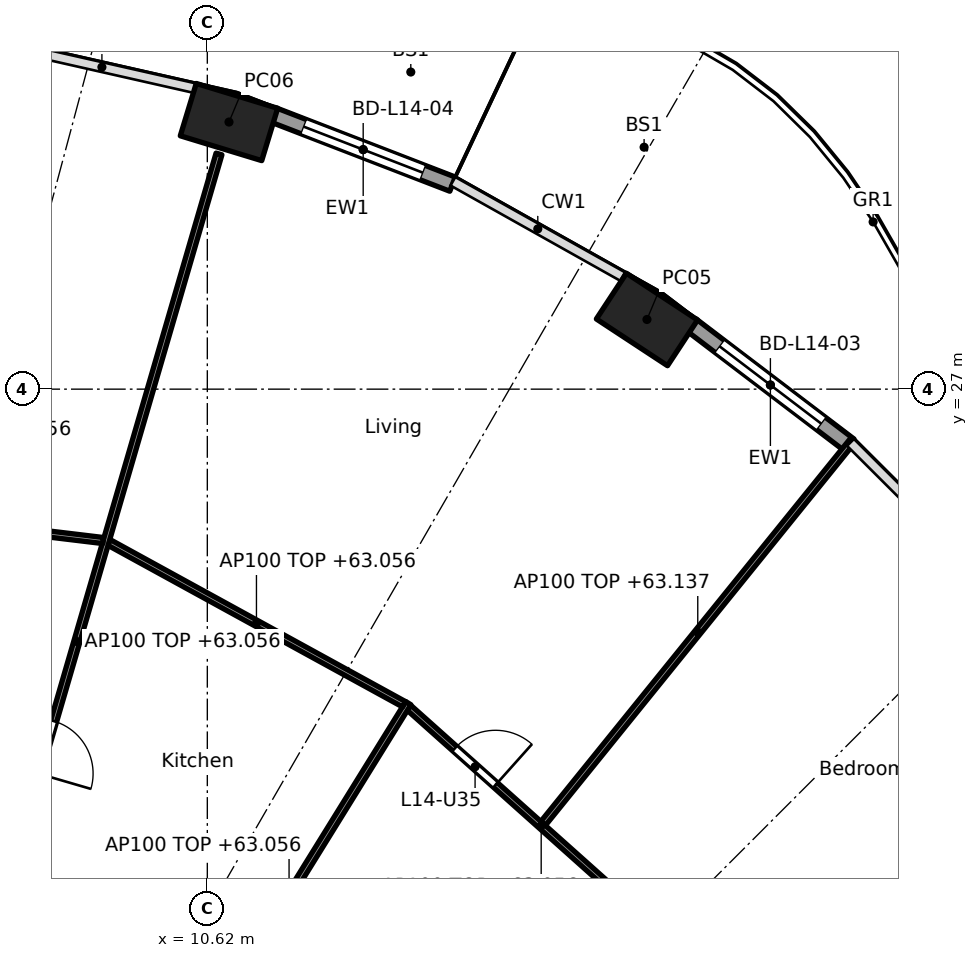
"""IFC4 building model, lengths in metres.
Left out: names, types, materials, properties, quantities, classifications, styles, units other than length and angle.
Written with IfcOpenShell. Run it as: python <this file> out.ifc"""

import sys

from ifc_helpers import new_model, si_unit, direction, frame, frame_2d, origin, origin_2d, place, context, subcontext, project, spatial, rectangle, hollow_rectangle, extrude, element, fill, save


model = new_model("IFC4")
c1 = context("Model", 3, precision=1e-05, world=origin(), true_north=direction((0.0, 1.0)))
c2 = subcontext(c1, "Body", "Model", "MODEL_VIEW")
j1 = project(units=[si_unit("LENGTHUNIT", "METRE"), si_unit("PLANEANGLEUNIT", "RADIAN")], contexts=[c1])
p1 = place(None, origin())
s1 = spatial("IfcSite", under=j1, at=p1, CompositionType="ELEMENT")
p2 = place(p1, origin())
s2 = spatial("IfcBuilding", under=s1, at=p2, CompositionType="ELEMENT")
p3 = place(p2, frame((0.0, 0.0, 60.3)))
s3 = spatial("IfcBuildingStorey", under=s2, at=p3, CompositionType="ELEMENT", Elevation=60.3)
for number, where, z_axis, x_axis in (
    (1, (17.85, 28.146, 0.0), (0.0, 0.0, 1.0), (-0.836, 0.549, 0.0)),
    (2, (10.976, 31.393, 0.0), (0.0, 0.0, 1.0), (-0.957, 0.292, 0.0)),
):
    element("IfcColumn", number, at=place(p3, frame(where, z_axis=z_axis, x_axis=x_axis)), inside=s3, PredefinedType="COLUMN", context=c2, shape_type="SweptSolid", body=[
        extrude(hollow_rectangle(XDim=1.4, YDim=0.9, WallThickness=0.05, at=origin_2d()), origin(), (0.0, 0.0, 1.0), 3.7),
    ])
p4 = place(p3, frame((18.582, 28.056, 0.0), z_axis=(0.0, 0.0, 1.0), x_axis=(0.796022293214, -0.605267303517, 0.0)))
e3 = element("IfcWall", 3, at=p4, inside=s3, PredefinedType="SOLIDWALL", context=c2, shape_type="SweptSolid", body=[
    extrude(rectangle(XDim=3.262, YDim=0.25, at=frame_2d((1.631, 0.0))), origin(), (0.0, 0.0, 1.0), 3.44),
])
p5 = place(p4, frame((0.581, 0.0, 0.0)))
e4 = element("IfcOpeningElement", 4, at=p5, cuts=e3, PredefinedType="OPENING", context=c2, shape_type="SweptSolid", body=[
    extrude(rectangle(XDim=2.1, YDim=2.4, at=frame_2d((1.05, 1.2))), frame((0.0, 0.135, 0.0), z_axis=(0.0, -1.0, 0.0), x_axis=(1.0, 0.0, 0.0)), (0.0, 0.0, 1.0), 0.27),
])
p6 = place(p3, frame((11.714, 31.507, 0.0), z_axis=(0.0, 0.0, 1.0), x_axis=(0.932809381943, -0.360370166577, 0.0)))
e5 = element("IfcWall", 5, at=p6, inside=s3, PredefinedType="SOLIDWALL", context=c2, shape_type="SweptSolid", body=[
    extrude(rectangle(XDim=3.151, YDim=0.25, at=frame_2d((1.575, 0.0))), origin(), (0.0, 0.0, 1.0), 3.44),
])
p7 = place(p6, frame((0.525, 0.0, 0.0)))
e6 = element("IfcOpeningElement", 6, at=p7, cuts=e5, PredefinedType="OPENING", context=c2, shape_type="SweptSolid", body=[
    extrude(rectangle(XDim=2.1, YDim=2.4, at=frame_2d((1.05, 1.2))), frame((0.0, 0.135, 0.0), z_axis=(0.0, -1.0, 0.0), x_axis=(1.0, 0.0, 0.0)), (0.0, 0.0, 1.0), 0.27),
])
p8 = place(p3, frame((14.329, 11.221, 0.0), z_axis=(0.0, 0.0, 1.0), x_axis=(0.810671130917, 0.58550176558, 0.0)))
e7 = element("IfcWall", 7, at=p8, inside=s3, PredefinedType="PARTITIONING", context=c2, shape_type="SweptSolid", body=[
    extrude(rectangle(XDim=15.106, YDim=0.1, at=frame_2d((7.553, 0.0))), origin(), (0.0, 0.0, 1.0), 2.837),
])
p9 = place(p8, frame((3.105, 0.0, 0.0)))
e8 = element("IfcOpeningElement", 8, at=p9, cuts=e7, PredefinedType="OPENING", context=c2, shape_type="SweptSolid", body=[
    extrude(rectangle(XDim=0.9, YDim=2.1, at=frame_2d((0.45, 1.05))), frame((0.0, 0.06, 0.0), z_axis=(0.0, -1.0, 0.0), x_axis=(1.0, 0.0, 0.0)), (0.0, 0.0, 1.0), 0.12),
])
p10 = place(p3, frame((18.285, 17.877, 0.0), z_axis=(0.0, 0.0, 1.0), x_axis=(-0.745806142791, 0.666163041136, 0.0)))
e9 = element("IfcWall", 9, at=p10, inside=s3, PredefinedType="PARTITIONING", context=c2, shape_type="SweptSolid", body=[
    extrude(rectangle(XDim=5.831, YDim=0.1, at=frame_2d((2.915, 0.0))), origin(), (0.0, 0.0, 1.0), 2.756),
])
p11 = place(p10, frame((3.923, 0.0, 0.0)))
e10 = element("IfcOpeningElement", 10, at=p11, cuts=e9, PredefinedType="OPENING", context=c2, shape_type="SweptSolid", body=[
    extrude(rectangle(XDim=0.9, YDim=2.1, at=frame_2d((0.45, 1.05))), frame((0.0, 0.06, 0.0), z_axis=(0.0, -1.0, 0.0), x_axis=(1.0, 0.0, 0.0)), (0.0, 0.0, 1.0), 0.12),
])
p12 = place(p3, frame((16.142, 19.858, 0.0), z_axis=(0.0, 0.0, 1.0), x_axis=(0.628738066508, 0.777617157555, 0.0)))
e11 = element("IfcWall", 11, at=p12, inside=s3, PredefinedType="PARTITIONING", context=c2, shape_type="SweptSolid", body=[
    extrude(rectangle(XDim=8.091, YDim=0.1, at=frame_2d((4.045, 0.0))), origin(), (0.0, 0.0, 1.0), 2.837),
])
p13 = place(p3, frame((10.003, 15.503, 0.0), z_axis=(0.0, 0.0, 1.0), x_axis=(0.52645953022, 0.850200189979, 0.0)))
e12 = element("IfcWall", 12, at=p13, inside=s3, PredefinedType="PARTITIONING", context=c2, shape_type="SweptSolid", body=[
    extrude(rectangle(XDim=7.45, YDim=0.1, at=frame_2d((3.725, 0.0))), origin(), (0.0, 0.0, 1.0), 2.756),
])
p14 = place(p3, frame((13.855, 21.818, 0.0), z_axis=(0.0, 0.0, 1.0), x_axis=(-0.876794415294, 0.480865421203, 0.0)))
e13 = element("IfcWall", 13, at=p14, inside=s3, PredefinedType="PARTITIONING", context=c2, shape_type="SweptSolid", body=[
    extrude(rectangle(XDim=5.536, YDim=0.1, at=frame_2d((2.768, 0.0))), origin(), (0.0, 0.0, 1.0), 2.756),
])
p15 = place(p3, frame((6.137, 14.83, 0.0), z_axis=(0.0, 0.0, 1.0), x_axis=(0.27985745069, 0.960041565399, 0.0)))
e14 = element("IfcWall", 14, at=p15, inside=s3, PredefinedType="PARTITIONING", context=c2, shape_type="SweptSolid", body=[
    extrude(rectangle(XDim=16.705, YDim=0.1, at=frame_2d((8.353, 0.0))), origin(), (0.0, 0.0, 1.0), 2.756),
])
p16 = place(p15, frame((1.334, 0.0, 0.0)))
e15 = element("IfcOpeningElement", 15, at=p16, cuts=e14, PredefinedType="OPENING", context=c2, shape_type="SweptSolid", body=[
    extrude(rectangle(XDim=0.9, YDim=2.1, at=frame_2d((0.45, 1.05))), frame((0.0, 0.06, 0.0), z_axis=(0.0, -1.0, 0.0), x_axis=(1.0, 0.0, 0.0)), (0.0, 0.0, 1.0), 0.12),
])
p17 = place(p15, frame((6.091, 0.0, 0.0)))
e16 = element("IfcOpeningElement", 16, at=p17, cuts=e14, PredefinedType="OPENING", context=c2, shape_type="SweptSolid", body=[
    extrude(rectangle(XDim=0.9, YDim=2.1, at=frame_2d((0.45, 1.05))), frame((0.0, 0.06, 0.0), z_axis=(0.0, -1.0, 0.0), x_axis=(1.0, 0.0, 0.0)), (0.0, 0.0, 1.0), 0.12),
])
p18 = place(p3, frame((8.907, 24.51, 0.0), z_axis=(0.0, 0.0, 1.0), x_axis=(-0.992836798252, 0.119478416615, 0.0)))
e17 = element("IfcWall", 17, at=p18, inside=s3, PredefinedType="PARTITIONING", context=c2, shape_type="SweptSolid", body=[
    extrude(rectangle(XDim=6.01, YDim=0.1, at=frame_2d((3.005, 0.0))), origin(), (0.0, 0.0, 1.0), 2.756),
])
p19 = place(p18, frame((2.555, 0.0, 0.0)))
e18 = element("IfcOpeningElement", 18, at=p19, cuts=e17, PredefinedType="OPENING", context=c2, shape_type="SweptSolid", body=[
    extrude(rectangle(XDim=0.9, YDim=2.1, at=frame_2d((0.45, 1.05))), frame((0.0, 0.06, 0.0), z_axis=(0.0, -1.0, 0.0), x_axis=(1.0, 0.0, 0.0)), (0.0, 0.0, 1.0), 0.12),
])
p20 = place(p5, origin())
e19 = element("IfcDoor", 19, at=p20, inside=s3, OperationType="SLIDING_TO_LEFT", PredefinedType="DOOR", context=c2, shape_type="SweptSolid", body=[
    extrude(rectangle(XDim=2.1, YDim=2.4, at=frame_2d((1.05, 1.2))), frame((0.0, 0.025, 0.0), z_axis=(0.0, -1.0, 0.0), x_axis=(1.0, 0.0, 0.0)), (0.0, 0.0, 1.0), 0.05),
])
fill(e4, e19)
p21 = place(p7, origin())
e20 = element("IfcDoor", 20, at=p21, inside=s3, OperationType="SLIDING_TO_LEFT", PredefinedType="DOOR", context=c2, shape_type="SweptSolid", body=[
    extrude(rectangle(XDim=2.1, YDim=2.4, at=frame_2d((1.05, 1.2))), frame((0.0, 0.025, 0.0), z_axis=(0.0, -1.0, 0.0), x_axis=(1.0, 0.0, 0.0)), (0.0, 0.0, 1.0), 0.05),
])
fill(e6, e20)
p22 = place(p17, frame((0.9, 0.0, 0.0), x_axis=(-1.0, 0.0, 0.0)))
e21 = element("IfcDoor", 21, at=p22, inside=s3, OperationType="SINGLE_SWING_RIGHT", PredefinedType="DOOR", context=c2, shape_type="SweptSolid", body=[
    extrude(rectangle(XDim=0.9, YDim=2.1, at=frame_2d((0.45, 1.05))), frame((0.0, 0.025, 0.0), z_axis=(0.0, -1.0, 0.0), x_axis=(1.0, 0.0, 0.0)), (0.0, 0.0, 1.0), 0.05),
])
fill(e16, e21)
p23 = place(p11, frame((0.9, 0.0, 0.0), x_axis=(-1.0, 0.0, 0.0)))
e22 = element("IfcDoor", 22, at=p23, inside=s3, OperationType="SINGLE_SWING_RIGHT", PredefinedType="DOOR", context=c2, shape_type="SweptSolid", body=[
    extrude(rectangle(XDim=0.9, YDim=2.1, at=frame_2d((0.45, 1.05))), frame((0.0, 0.025, 0.0), z_axis=(0.0, -1.0, 0.0), x_axis=(1.0, 0.0, 0.0)), (0.0, 0.0, 1.0), 0.05),
])
fill(e10, e22)
save(model, sys.argv[1])
